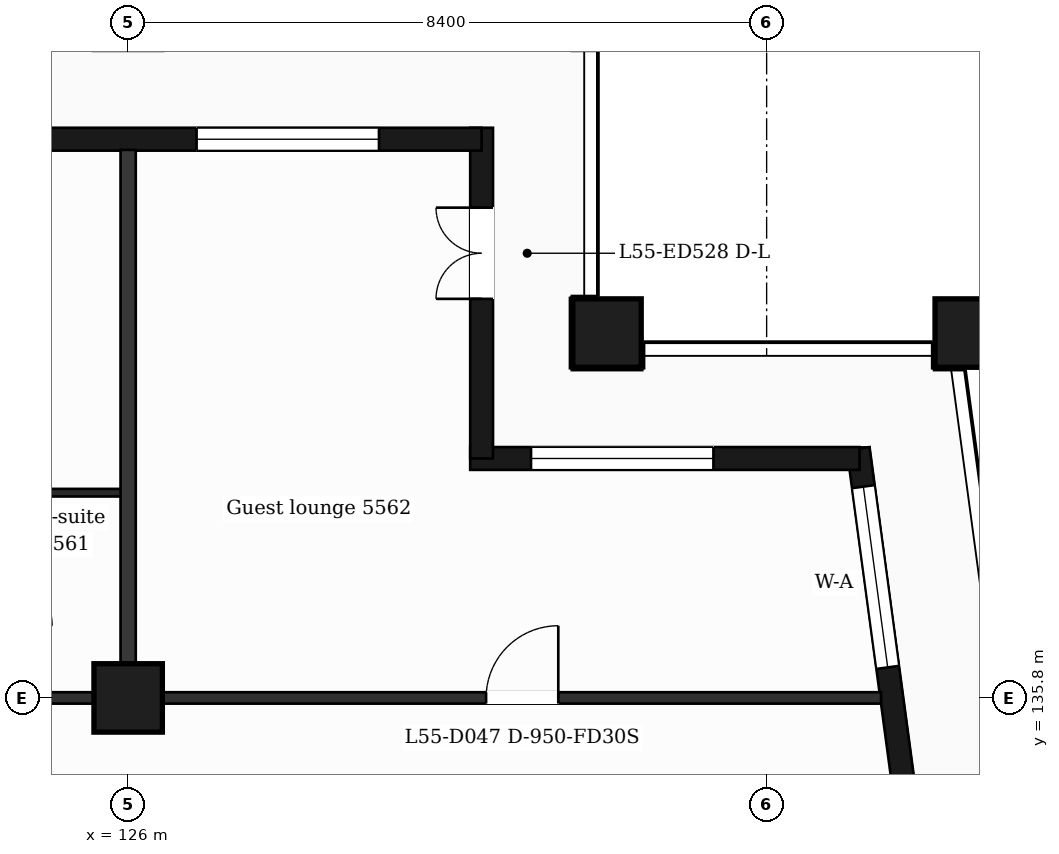
"""IFC4 building model, lengths in metres.
Left out: names, types, materials, properties, quantities, classifications, styles, units other than length and angle.
Written with IfcOpenShell. Run it as: python <this file> out.ifc"""

import sys

from ifc_helpers import new_model, si_unit, direction, frame, frame_2d, origin, origin_2d, place, context, subcontext, project, spatial, rectangle, extrude, element, fill, save


model = new_model("IFC4")
c1 = context("Model", 3, precision=1e-05, world=origin(), true_north=direction((0.0, 1.0)))
c2 = subcontext(c1, "Body", "Model", "MODEL_VIEW")
j1 = project(units=[si_unit("LENGTHUNIT", "METRE"), si_unit("PLANEANGLEUNIT", "RADIAN")], contexts=[c1])
p1 = place(None, origin())
s1 = spatial("IfcSite", under=j1, at=p1, CompositionType="ELEMENT")
p2 = place(p1, origin())
s2 = spatial("IfcBuilding", under=s1, at=p2, CompositionType="ELEMENT")
p3 = place(p2, frame((0.0, 0.0, 228.1)))
s3 = spatial("IfcBuildingStorey", under=s2, at=p3, CompositionType="ELEMENT", Elevation=228.1)
for number, where, z_axis, x_axis in (
    (1, (132.3, 140.6, 0.0), (0.0, 0.0, 1.0), (1.0, 0.0, 0.0)),
    (2, (137.065, 140.6, 0.0), (0.0, 0.0, 1.0), (1.0, 0.0, 0.0)),
    (3, (126.0, 135.8, 0.0), (0.0, 0.0, 1.0), (1.0, 0.0, 0.0)),
):
    element("IfcColumn", number, at=place(p3, frame(where, z_axis=z_axis, x_axis=x_axis)), inside=s3, PredefinedType="COLUMN", context=c2, shape_type="SweptSolid", body=[
        extrude(rectangle(XDim=0.9, YDim=0.9, at=origin_2d()), origin(), (0.0, 0.0, 1.0), 3.7),
    ])
p4 = place(p3, frame((136.504, 132.4, 0.0), z_axis=(0.0, 0.0, 1.0), x_axis=(-0.133399697462, 0.99106231929, 0.0)))
e4 = element("IfcWall", 4, at=p4, inside=s3, PredefinedType="SOLIDWALL", context=c2, shape_type="SweptSolid", body=[
    extrude(rectangle(XDim=6.74, YDim=0.3, at=frame_2d((3.37, 0.0))), origin(), (0.0, 0.0, 1.0), 3.38),
])
p5 = place(p4, frame((1.115, 0.0, 0.0)))
e5 = element("IfcOpeningElement", 5, at=p5, cuts=e4, PredefinedType="OPENING", context=c2, shape_type="SweptSolid", body=[
    extrude(rectangle(XDim=1.2, YDim=2.4, at=frame_2d((0.6, 1.2))), frame((0.0, 0.16, 0.0), z_axis=(0.0, -1.0, 0.0), x_axis=(1.0, 0.0, 0.0)), (0.0, 0.0, 1.0), 0.32),
])
p6 = place(p4, frame((3.835, 0.0, 0.9)))
e6 = element("IfcOpeningElement", 6, at=p6, cuts=e4, PredefinedType="OPENING", context=c2, shape_type="SweptSolid", body=[
    extrude(rectangle(XDim=2.4, YDim=2.1, at=frame_2d((1.2, 1.05))), frame((0.0, 0.16, 0.0), z_axis=(0.0, -1.0, 0.0), x_axis=(1.0, 0.0, 0.0)), (0.0, 0.0, 1.0), 0.32),
])
p7 = place(p3, frame((135.623, 138.95, 0.0), z_axis=(0.0, 0.0, 1.0), x_axis=(-1.0, 0.0, 0.0)))
e7 = element("IfcWall", 7, at=p7, inside=s3, PredefinedType="SOLIDWALL", context=c2, shape_type="SweptSolid", body=[
    extrude(rectangle(XDim=5.123, YDim=0.3, at=frame_2d((2.561, 0.0))), origin(), (0.0, 0.0, 1.0), 3.38),
])
p8 = place(p7, frame((1.923, 0.0, 0.9)))
e8 = element("IfcOpeningElement", 8, at=p8, cuts=e7, PredefinedType="OPENING", context=c2, shape_type="SweptSolid", body=[
    extrude(rectangle(XDim=2.4, YDim=2.1, at=frame_2d((1.2, 1.05))), frame((0.0, 0.16, 0.0), z_axis=(0.0, -1.0, 0.0), x_axis=(1.0, 0.0, 0.0)), (0.0, 0.0, 1.0), 0.32),
])
p9 = place(p3, frame((130.65, 138.95, 0.0), z_axis=(0.0, 0.0, 1.0), x_axis=(0.0, 1.0, 0.0)))
e9 = element("IfcWall", 9, at=p9, inside=s3, PredefinedType="SOLIDWALL", context=c2, shape_type="SweptSolid", body=[
    extrude(rectangle(XDim=4.35, YDim=0.3, at=frame_2d((2.175, 0.0))), origin(), (0.0, 0.0, 1.0), 3.38),
])
p10 = place(p9, frame((2.1, 0.0, 0.0)))
e10 = element("IfcOpeningElement", 10, at=p10, cuts=e9, PredefinedType="OPENING", context=c2, shape_type="SweptSolid", body=[
    extrude(rectangle(XDim=1.2, YDim=2.4, at=frame_2d((0.6, 1.2))), frame((0.0, 0.16, 0.0), z_axis=(0.0, -1.0, 0.0), x_axis=(1.0, 0.0, 0.0)), (0.0, 0.0, 1.0), 0.32),
])
p11 = place(p3, frame((130.65, 143.15, 0.0), z_axis=(0.0, 0.0, 1.0), x_axis=(-1.0, 0.0, 0.0)))
e11 = element("IfcWall", 11, at=p11, inside=s3, PredefinedType="SOLIDWALL", context=c2, shape_type="SweptSolid", body=[
    extrude(rectangle(XDim=14.25, YDim=0.3, at=frame_2d((7.125, 0.0))), origin(), (0.0, 0.0, 1.0), 3.38),
])
p12 = place(p11, frame((1.35, 0.0, 0.9)))
e12 = element("IfcOpeningElement", 12, at=p12, cuts=e11, PredefinedType="OPENING", context=c2, shape_type="SweptSolid", body=[
    extrude(rectangle(XDim=2.4, YDim=2.1, at=frame_2d((1.2, 1.05))), frame((0.0, 0.16, 0.0), z_axis=(0.0, -1.0, 0.0), x_axis=(1.0, 0.0, 0.0)), (0.0, 0.0, 1.0), 0.32),
])
p13 = place(p11, frame((6.15, 0.0, 0.0)))
e13 = element("IfcOpeningElement", 13, at=p13, cuts=e11, PredefinedType="OPENING", context=c2, shape_type="SweptSolid", body=[
    extrude(rectangle(XDim=1.2, YDim=2.4, at=frame_2d((0.6, 1.2))), frame((0.0, 0.16, 0.0), z_axis=(0.0, -1.0, 0.0), x_axis=(1.0, 0.0, 0.0)), (0.0, 0.0, 1.0), 0.32),
])
p14 = place(p11, frame((9.75, 0.0, 0.9)))
e14 = element("IfcOpeningElement", 14, at=p14, cuts=e11, PredefinedType="OPENING", context=c2, shape_type="SweptSolid", body=[
    extrude(rectangle(XDim=2.4, YDim=2.1, at=frame_2d((1.2, 1.05))), frame((0.0, 0.16, 0.0), z_axis=(0.0, -1.0, 0.0), x_axis=(1.0, 0.0, 0.0)), (0.0, 0.0, 1.0), 0.32),
])
p15 = place(p3, frame((90.895, 135.8, 0.0), z_axis=(0.0, 0.0, 1.0), x_axis=(1.0, 0.0, 0.0)))
e15 = element("IfcWall", 15, at=p15, inside=s3, PredefinedType="PARTITIONING", context=c2, shape_type="SweptSolid", body=[
    extrude(rectangle(XDim=45.011, YDim=0.15, at=frame_2d((22.505, 0.0))), origin(), (0.0, 0.0, 1.0), 3.38),
])
p16 = place(p15, frame((6.906, 0.0, 0.0)))
e16 = element("IfcOpeningElement", 16, at=p16, cuts=e15, PredefinedType="OPENING", context=c2, shape_type="SweptSolid", body=[
    extrude(rectangle(XDim=1.0, YDim=2.1, at=frame_2d((0.5, 1.05))), frame((0.0, 0.085, 0.0), z_axis=(0.0, -1.0, 0.0), x_axis=(1.0, 0.0, 0.0)), (0.0, 0.0, 1.0), 0.17),
])
p17 = place(p15, frame((15.281, 0.0, 0.0)))
e17 = element("IfcOpeningElement", 17, at=p17, cuts=e15, PredefinedType="OPENING", context=c2, shape_type="SweptSolid", body=[
    extrude(rectangle(XDim=1.0, YDim=2.1, at=frame_2d((0.5, 1.05))), frame((0.0, 0.085, 0.0), z_axis=(0.0, -1.0, 0.0), x_axis=(1.0, 0.0, 0.0)), (0.0, 0.0, 1.0), 0.17),
])
p18 = place(p15, frame((25.045, 0.0, 0.0)))
e18 = element("IfcOpeningElement", 18, at=p18, cuts=e15, PredefinedType="OPENING", context=c2, shape_type="SweptSolid", body=[
    extrude(rectangle(XDim=1.0, YDim=2.1, at=frame_2d((0.5, 1.05))), frame((0.0, 0.085, 0.0), z_axis=(0.0, -1.0, 0.0), x_axis=(1.0, 0.0, 0.0)), (0.0, 0.0, 1.0), 0.17),
])
p19 = place(p15, frame((29.531, 0.0, 0.0)))
e19 = element("IfcOpeningElement", 19, at=p19, cuts=e15, PredefinedType="OPENING", context=c2, shape_type="SweptSolid", body=[
    extrude(rectangle(XDim=0.95, YDim=2.1, at=frame_2d((0.475, 1.05))), frame((0.0, 0.085, 0.0), z_axis=(0.0, -1.0, 0.0), x_axis=(1.0, 0.0, 0.0)), (0.0, 0.0, 1.0), 0.17),
])
p20 = place(p15, frame((39.814, 0.0, 0.0)))
e20 = element("IfcOpeningElement", 20, at=p20, cuts=e15, PredefinedType="OPENING", context=c2, shape_type="SweptSolid", body=[
    extrude(rectangle(XDim=0.95, YDim=2.1, at=frame_2d((0.475, 1.05))), frame((0.0, 0.085, 0.0), z_axis=(0.0, -1.0, 0.0), x_axis=(1.0, 0.0, 0.0)), (0.0, 0.0, 1.0), 0.17),
])
p21 = place(p3, frame((124.15, 138.5, 0.0), z_axis=(0.0, 0.0, 1.0), x_axis=(1.0, 0.0, 0.0)))
e21 = element("IfcWall", 21, at=p21, inside=s3, PredefinedType="PARTITIONING", context=c2, shape_type="SweptSolid", body=[
    extrude(rectangle(XDim=1.85, YDim=0.1, at=frame_2d((0.925, 0.0))), origin(), (0.0, 0.0, 1.0), 3.38),
])
p22 = place(p3, frame((126.0, 135.875, 0.0), z_axis=(0.0, 0.0, 1.0), x_axis=(0.0, 1.0, 0.0)))
e22 = element("IfcWall", 22, at=p22, inside=s3, PredefinedType="PARTITIONING", context=c2, shape_type="SweptSolid", body=[
    extrude(rectangle(XDim=7.135, YDim=0.2, at=frame_2d((3.567, 0.0))), origin(), (0.0, 0.0, 1.0), 3.38),
])
p23 = place(p6, origin())
e23 = element("IfcWindow", 23, at=p23, inside=s3, PartitioningType="SINGLE_PANEL", PredefinedType="WINDOW", context=c2, shape_type="SweptSolid", body=[
    extrude(rectangle(XDim=2.4, YDim=2.1, at=frame_2d((1.2, 1.05))), frame((0.0, 0.03, 0.0), z_axis=(0.0, -1.0, 0.0), x_axis=(1.0, 0.0, 0.0)), (0.0, 0.0, 1.0), 0.06),
])
fill(e6, e23)
p24 = place(p8, origin())
e24 = element("IfcWindow", 24, at=p24, inside=s3, PartitioningType="SINGLE_PANEL", PredefinedType="WINDOW", context=c2, shape_type="SweptSolid", body=[
    extrude(rectangle(XDim=2.4, YDim=2.1, at=frame_2d((1.2, 1.05))), frame((0.0, 0.03, 0.0), z_axis=(0.0, -1.0, 0.0), x_axis=(1.0, 0.0, 0.0)), (0.0, 0.0, 1.0), 0.06),
])
fill(e8, e24)
p25 = place(p10, origin())
e25 = element("IfcDoor", 25, at=p25, inside=s3, OperationType="DOUBLE_DOOR_SINGLE_SWING", PredefinedType="DOOR", context=c2, shape_type="SweptSolid", body=[
    extrude(rectangle(XDim=1.2, YDim=2.4, at=frame_2d((0.6, 1.2))), frame((0.0, 0.025, 0.0), z_axis=(0.0, -1.0, 0.0), x_axis=(1.0, 0.0, 0.0)), (0.0, 0.0, 1.0), 0.05),
])
fill(e10, e25)
p26 = place(p12, origin())
e26 = element("IfcWindow", 26, at=p26, inside=s3, PartitioningType="SINGLE_PANEL", PredefinedType="WINDOW", context=c2, shape_type="SweptSolid", body=[
    extrude(rectangle(XDim=2.4, YDim=2.1, at=frame_2d((1.2, 1.05))), frame((0.0, 0.03, 0.0), z_axis=(0.0, -1.0, 0.0), x_axis=(1.0, 0.0, 0.0)), (0.0, 0.0, 1.0), 0.06),
])
fill(e12, e26)
p27 = place(p20, origin())
e27 = element("IfcDoor", 27, at=p27, inside=s3, OperationType="SINGLE_SWING_RIGHT", PredefinedType="DOOR", context=c2, shape_type="SweptSolid", body=[
    extrude(rectangle(XDim=0.95, YDim=2.1, at=frame_2d((0.475, 1.05))), frame((0.0, 0.025, 0.0), z_axis=(0.0, -1.0, 0.0), x_axis=(1.0, 0.0, 0.0)), (0.0, 0.0, 1.0), 0.05),
])
fill(e20, e27)
save(model, sys.argv[1])
